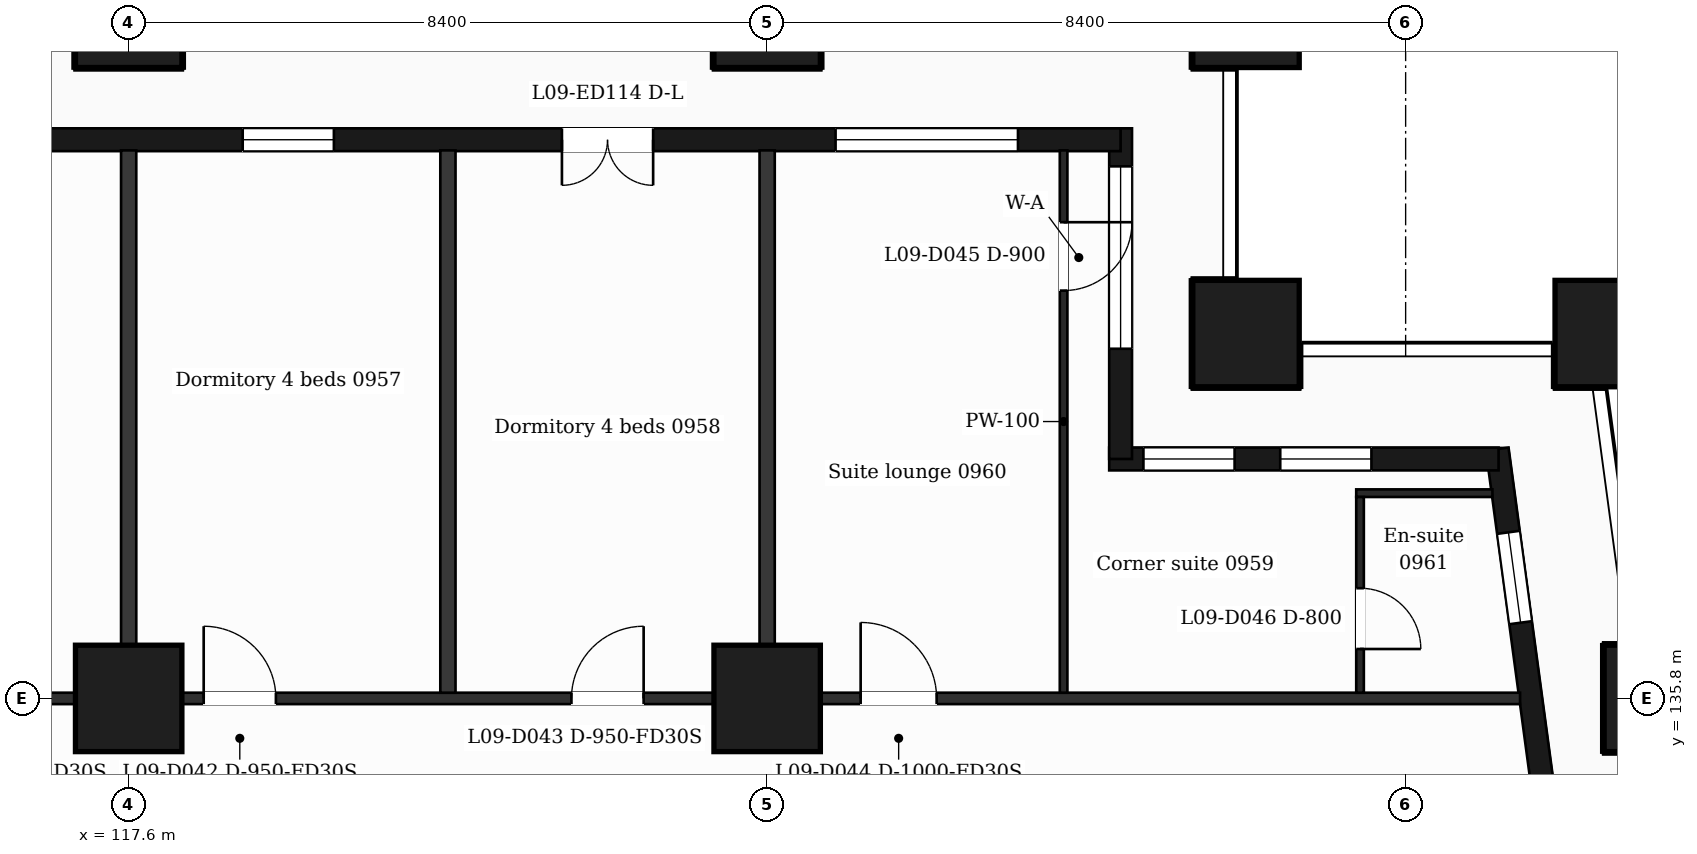
"""IFC4 building model, lengths in metres.
Left out: names, types, materials, properties, quantities, classifications, styles, units other than length and angle.
Written with IfcOpenShell. Run it as: python <this file> out.ifc"""

import sys

from ifc_helpers import new_model, si_unit, direction, frame, frame_2d, origin, origin_2d, place, context, subcontext, project, spatial, rectangle, extrude, element, fill, save


model = new_model("IFC4")
c1 = context("Model", 3, precision=1e-05, world=origin(), true_north=direction((0.0, 1.0)))
c2 = subcontext(c1, "Body", "Model", "MODEL_VIEW")
j1 = project(units=[si_unit("LENGTHUNIT", "METRE"), si_unit("PLANEANGLEUNIT", "RADIAN")], contexts=[c1])
p1 = place(None, origin())
s1 = spatial("IfcSite", under=j1, at=p1, CompositionType="ELEMENT")
p2 = place(p1, origin())
s2 = spatial("IfcBuilding", under=s1, at=p2, CompositionType="ELEMENT")
p3 = place(p2, frame((0.0, 0.0, 49.5)))
s3 = spatial("IfcBuildingStorey", under=s2, at=p3, CompositionType="ELEMENT", Elevation=49.5)
for number, where, z_axis, x_axis in (
    (1, (132.3, 140.6, 0.0), (0.0, 0.0, 1.0), (1.0, 0.0, 0.0)),
    (2, (137.065, 140.6, 0.0), (0.0, 0.0, 1.0), (1.0, 0.0, 0.0)),
    (3, (117.6, 135.8, 0.0), (0.0, 0.0, 1.0), (1.0, 0.0, 0.0)),
    (4, (126.0, 135.8, 0.0), (0.0, 0.0, 1.0), (1.0, 0.0, 0.0)),
    (5, (137.711, 135.8, 0.0), (0.0, 0.0, 1.0), (1.0, 0.0, 0.0)),
    (6, (117.6, 144.8, 0.0), (0.0, 0.0, 1.0), (1.0, 0.0, 0.0)),
    (7, (126.0, 144.8, 0.0), (0.0, 0.0, 1.0), (1.0, 0.0, 0.0)),
    (8, (132.3, 144.8, 0.0), (0.0, 0.0, 1.0), (1.0, 0.0, 0.0)),
):
    element("IfcColumn", number, at=place(p3, frame(where, z_axis=z_axis, x_axis=x_axis)), inside=s3, PredefinedType="COLUMN", context=c2, shape_type="SweptSolid", body=[
        extrude(rectangle(XDim=1.4, YDim=1.4, at=origin_2d()), origin(), (0.0, 0.0, 1.0), 3.5),
    ])
p4 = place(p3, frame((136.504, 132.4, 0.0), z_axis=(0.0, 0.0, 1.0), x_axis=(-0.133399697462, 0.99106231929, 0.0)))
e9 = element("IfcWall", 9, at=p4, inside=s3, PredefinedType="SOLIDWALL", context=c2, shape_type="SweptSolid", body=[
    extrude(rectangle(XDim=6.74, YDim=0.3, at=frame_2d((3.37, 0.0))), origin(), (0.0, 0.0, 1.0), 3.18),
])
p5 = place(p4, frame((1.115, 0.0, 0.0)))
e10 = element("IfcOpeningElement", 10, at=p5, cuts=e9, PredefinedType="OPENING", context=c2, shape_type="SweptSolid", body=[
    extrude(rectangle(XDim=1.2, YDim=2.4, at=frame_2d((0.6, 1.2))), frame((0.0, 0.16, 0.0), z_axis=(0.0, -1.0, 0.0), x_axis=(1.0, 0.0, 0.0)), (0.0, 0.0, 1.0), 0.32),
])
p6 = place(p4, frame((4.436, 0.0, 0.9)))
e11 = element("IfcOpeningElement", 11, at=p6, cuts=e9, PredefinedType="OPENING", context=c2, shape_type="SweptSolid", body=[
    extrude(rectangle(XDim=1.2, YDim=2.1, at=frame_2d((0.6, 1.05))), frame((0.0, 0.16, 0.0), z_axis=(0.0, -1.0, 0.0), x_axis=(1.0, 0.0, 0.0)), (0.0, 0.0, 1.0), 0.32),
])
p7 = place(p3, frame((135.623, 138.95, 0.0), z_axis=(0.0, 0.0, 1.0), x_axis=(-1.0, 0.0, 0.0)))
e12 = element("IfcWall", 12, at=p7, inside=s3, PredefinedType="SOLIDWALL", context=c2, shape_type="SweptSolid", body=[
    extrude(rectangle(XDim=5.123, YDim=0.3, at=frame_2d((2.561, 0.0))), origin(), (0.0, 0.0, 1.0), 3.18),
])
p8 = place(p7, frame((1.673, 0.0, 0.9)))
e13 = element("IfcOpeningElement", 13, at=p8, cuts=e12, PredefinedType="OPENING", context=c2, shape_type="SweptSolid", body=[
    extrude(rectangle(XDim=1.2, YDim=2.1, at=frame_2d((0.6, 1.05))), frame((0.0, 0.16, 0.0), z_axis=(0.0, -1.0, 0.0), x_axis=(1.0, 0.0, 0.0)), (0.0, 0.0, 1.0), 0.32),
])
p9 = place(p7, frame((3.473, 0.0, 0.9)))
e14 = element("IfcOpeningElement", 14, at=p9, cuts=e12, PredefinedType="OPENING", context=c2, shape_type="SweptSolid", body=[
    extrude(rectangle(XDim=1.2, YDim=2.1, at=frame_2d((0.6, 1.05))), frame((0.0, 0.16, 0.0), z_axis=(0.0, -1.0, 0.0), x_axis=(1.0, 0.0, 0.0)), (0.0, 0.0, 1.0), 0.32),
])
p10 = place(p3, frame((130.65, 138.95, 0.0), z_axis=(0.0, 0.0, 1.0), x_axis=(0.0, 1.0, 0.0)))
e15 = element("IfcWall", 15, at=p10, inside=s3, PredefinedType="SOLIDWALL", context=c2, shape_type="SweptSolid", body=[
    extrude(rectangle(XDim=4.35, YDim=0.3, at=frame_2d((2.175, 0.0))), origin(), (0.0, 0.0, 1.0), 3.18),
])
p11 = place(p10, frame((1.45, 0.0, 0.9)))
e16 = element("IfcOpeningElement", 16, at=p11, cuts=e15, PredefinedType="OPENING", context=c2, shape_type="SweptSolid", body=[
    extrude(rectangle(XDim=2.4, YDim=2.1, at=frame_2d((1.2, 1.05))), frame((0.0, 0.16, 0.0), z_axis=(0.0, -1.0, 0.0), x_axis=(1.0, 0.0, 0.0)), (0.0, 0.0, 1.0), 0.32),
])
p12 = place(p3, frame((130.65, 143.15, 0.0), z_axis=(0.0, 0.0, 1.0), x_axis=(-1.0, 0.0, 0.0)))
e17 = element("IfcWall", 17, at=p12, inside=s3, PredefinedType="SOLIDWALL", context=c2, shape_type="SweptSolid", body=[
    extrude(rectangle(XDim=14.25, YDim=0.3, at=frame_2d((7.125, 0.0))), origin(), (0.0, 0.0, 1.0), 3.18),
])
p13 = place(p12, frame((1.35, 0.0, 0.9)))
e18 = element("IfcOpeningElement", 18, at=p13, cuts=e17, PredefinedType="OPENING", context=c2, shape_type="SweptSolid", body=[
    extrude(rectangle(XDim=2.4, YDim=2.1, at=frame_2d((1.2, 1.05))), frame((0.0, 0.16, 0.0), z_axis=(0.0, -1.0, 0.0), x_axis=(1.0, 0.0, 0.0)), (0.0, 0.0, 1.0), 0.32),
])
p14 = place(p12, frame((6.15, 0.0, 0.0)))
e19 = element("IfcOpeningElement", 19, at=p14, cuts=e17, PredefinedType="OPENING", context=c2, shape_type="SweptSolid", body=[
    extrude(rectangle(XDim=1.2, YDim=2.4, at=frame_2d((0.6, 1.2))), frame((0.0, 0.16, 0.0), z_axis=(0.0, -1.0, 0.0), x_axis=(1.0, 0.0, 0.0)), (0.0, 0.0, 1.0), 0.32),
])
p15 = place(p12, frame((10.35, 0.0, 0.9)))
e20 = element("IfcOpeningElement", 20, at=p15, cuts=e17, PredefinedType="OPENING", context=c2, shape_type="SweptSolid", body=[
    extrude(rectangle(XDim=1.2, YDim=2.1, at=frame_2d((0.6, 1.05))), frame((0.0, 0.16, 0.0), z_axis=(0.0, -1.0, 0.0), x_axis=(1.0, 0.0, 0.0)), (0.0, 0.0, 1.0), 0.32),
])
p16 = place(p3, frame((90.895, 135.8, 0.0), z_axis=(0.0, 0.0, 1.0), x_axis=(1.0, 0.0, 0.0)))
e21 = element("IfcWall", 21, at=p16, inside=s3, PredefinedType="PARTITIONING", context=c2, shape_type="SweptSolid", body=[
    extrude(rectangle(XDim=45.011, YDim=0.15, at=frame_2d((22.505, 0.0))), origin(), (0.0, 0.0, 1.0), 3.18),
])
p17 = place(p16, frame((7.675, 0.0, 0.0)))
e22 = element("IfcOpeningElement", 22, at=p17, cuts=e21, PredefinedType="OPENING", context=c2, shape_type="SweptSolid", body=[
    extrude(rectangle(XDim=1.0, YDim=2.1, at=frame_2d((0.5, 1.05))), frame((0.0, 0.085, 0.0), z_axis=(0.0, -1.0, 0.0), x_axis=(1.0, 0.0, 0.0)), (0.0, 0.0, 1.0), 0.17),
])
p18 = place(p16, frame((13.969, 0.0, 0.0)))
e23 = element("IfcOpeningElement", 23, at=p18, cuts=e21, PredefinedType="OPENING", context=c2, shape_type="SweptSolid", body=[
    extrude(rectangle(XDim=0.95, YDim=2.1, at=frame_2d((0.475, 1.05))), frame((0.0, 0.085, 0.0), z_axis=(0.0, -1.0, 0.0), x_axis=(1.0, 0.0, 0.0)), (0.0, 0.0, 1.0), 0.17),
])
p19 = place(p16, frame((24.393, 0.0, 0.0)))
e24 = element("IfcOpeningElement", 24, at=p19, cuts=e21, PredefinedType="OPENING", context=c2, shape_type="SweptSolid", body=[
    extrude(rectangle(XDim=0.95, YDim=2.1, at=frame_2d((0.475, 1.05))), frame((0.0, 0.085, 0.0), z_axis=(0.0, -1.0, 0.0), x_axis=(1.0, 0.0, 0.0)), (0.0, 0.0, 1.0), 0.17),
])
p20 = place(p16, frame((27.692, 0.0, 0.0)))
e25 = element("IfcOpeningElement", 25, at=p20, cuts=e21, PredefinedType="OPENING", context=c2, shape_type="SweptSolid", body=[
    extrude(rectangle(XDim=0.95, YDim=2.1, at=frame_2d((0.475, 1.05))), frame((0.0, 0.085, 0.0), z_axis=(0.0, -1.0, 0.0), x_axis=(1.0, 0.0, 0.0)), (0.0, 0.0, 1.0), 0.17),
])
p21 = place(p16, frame((32.531, 0.0, 0.0)))
e26 = element("IfcOpeningElement", 26, at=p21, cuts=e21, PredefinedType="OPENING", context=c2, shape_type="SweptSolid", body=[
    extrude(rectangle(XDim=0.95, YDim=2.1, at=frame_2d((0.475, 1.05))), frame((0.0, 0.085, 0.0), z_axis=(0.0, -1.0, 0.0), x_axis=(1.0, 0.0, 0.0)), (0.0, 0.0, 1.0), 0.17),
])
p22 = place(p16, frame((36.335, 0.0, 0.0)))
e27 = element("IfcOpeningElement", 27, at=p22, cuts=e21, PredefinedType="OPENING", context=c2, shape_type="SweptSolid", body=[
    extrude(rectangle(XDim=1.0, YDim=2.1, at=frame_2d((0.5, 1.05))), frame((0.0, 0.085, 0.0), z_axis=(0.0, -1.0, 0.0), x_axis=(1.0, 0.0, 0.0)), (0.0, 0.0, 1.0), 0.17),
])
p23 = place(p3, frame((133.75, 138.5, 0.0), z_axis=(0.0, 0.0, 1.0), x_axis=(1.0, 0.0, 0.0)))
e28 = element("IfcWall", 28, at=p23, inside=s3, PredefinedType="PARTITIONING", context=c2, shape_type="SweptSolid", body=[
    extrude(rectangle(XDim=1.792, YDim=0.1, at=frame_2d((0.896, 0.0))), origin(), (0.0, 0.0, 1.0), 3.18),
])
for number, where, z_axis, x_axis in (
    (29, (117.6, 135.875, 0.0), (0.0, 0.0, 1.0), (0.0, 1.0, 0.0)),
    (30, (121.8, 135.875, 0.0), (0.0, 0.0, 1.0), (0.0, 1.0, 0.0)),
    (31, (126.0, 135.875, 0.0), (0.0, 0.0, 1.0), (0.0, 1.0, 0.0)),
):
    element("IfcWall", number, at=place(p3, frame(where, z_axis=z_axis, x_axis=x_axis)), inside=s3, PredefinedType="PARTITIONING", context=c2, shape_type="SweptSolid", body=[
        extrude(rectangle(XDim=7.135, YDim=0.2, at=frame_2d((3.567, 0.0))), origin(), (0.0, 0.0, 1.0), 3.18),
    ])
p24 = place(p3, frame((129.9, 135.875, 0.0), z_axis=(0.0, 0.0, 1.0), x_axis=(0.0, 1.0, 0.0)))
e32 = element("IfcWall", 32, at=p24, inside=s3, PredefinedType="PARTITIONING", context=c2, shape_type="SweptSolid", body=[
    extrude(rectangle(XDim=7.135, YDim=0.1, at=frame_2d((3.567, 0.0))), origin(), (0.0, 0.0, 1.0), 3.18),
])
p25 = place(p24, frame((5.29, 0.0, 0.0)))
e33 = element("IfcOpeningElement", 33, at=p25, cuts=e32, PredefinedType="OPENING", context=c2, shape_type="SweptSolid", body=[
    extrude(rectangle(XDim=0.9, YDim=2.1, at=frame_2d((0.45, 1.05))), frame((0.0, 0.06, 0.0), z_axis=(0.0, -1.0, 0.0), x_axis=(1.0, 0.0, 0.0)), (0.0, 0.0, 1.0), 0.12),
])
p26 = place(p3, frame((133.8, 135.875, 0.0), z_axis=(0.0, 0.0, 1.0), x_axis=(0.0, 1.0, 0.0)))
e34 = element("IfcWall", 34, at=p26, inside=s3, PredefinedType="PARTITIONING", context=c2, shape_type="SweptSolid", body=[
    extrude(rectangle(XDim=2.575, YDim=0.1, at=frame_2d((1.288, 0.0))), origin(), (0.0, 0.0, 1.0), 3.18),
])
p27 = place(p26, frame((0.575, 0.0, 0.0)))
e35 = element("IfcOpeningElement", 35, at=p27, cuts=e34, PredefinedType="OPENING", context=c2, shape_type="SweptSolid", body=[
    extrude(rectangle(XDim=0.8, YDim=2.1, at=frame_2d((0.4, 1.05))), frame((0.0, 0.06, 0.0), z_axis=(0.0, -1.0, 0.0), x_axis=(1.0, 0.0, 0.0)), (0.0, 0.0, 1.0), 0.12),
])
p28 = place(p6, origin())
e36 = element("IfcWindow", 36, at=p28, inside=s3, PartitioningType="SINGLE_PANEL", PredefinedType="WINDOW", context=c2, shape_type="SweptSolid", body=[
    extrude(rectangle(XDim=1.2, YDim=2.1, at=frame_2d((0.6, 1.05))), frame((0.0, 0.03, 0.0), z_axis=(0.0, -1.0, 0.0), x_axis=(1.0, 0.0, 0.0)), (0.0, 0.0, 1.0), 0.06),
])
fill(e11, e36)
p29 = place(p8, origin())
e37 = element("IfcWindow", 37, at=p29, inside=s3, PartitioningType="SINGLE_PANEL", PredefinedType="WINDOW", context=c2, shape_type="SweptSolid", body=[
    extrude(rectangle(XDim=1.2, YDim=2.1, at=frame_2d((0.6, 1.05))), frame((0.0, 0.03, 0.0), z_axis=(0.0, -1.0, 0.0), x_axis=(1.0, 0.0, 0.0)), (0.0, 0.0, 1.0), 0.06),
])
fill(e13, e37)
p30 = place(p9, origin())
e38 = element("IfcWindow", 38, at=p30, inside=s3, PartitioningType="SINGLE_PANEL", PredefinedType="WINDOW", context=c2, shape_type="SweptSolid", body=[
    extrude(rectangle(XDim=1.2, YDim=2.1, at=frame_2d((0.6, 1.05))), frame((0.0, 0.03, 0.0), z_axis=(0.0, -1.0, 0.0), x_axis=(1.0, 0.0, 0.0)), (0.0, 0.0, 1.0), 0.06),
])
fill(e14, e38)
p31 = place(p11, origin())
e39 = element("IfcWindow", 39, at=p31, inside=s3, PartitioningType="SINGLE_PANEL", PredefinedType="WINDOW", context=c2, shape_type="SweptSolid", body=[
    extrude(rectangle(XDim=2.4, YDim=2.1, at=frame_2d((1.2, 1.05))), frame((0.0, 0.03, 0.0), z_axis=(0.0, -1.0, 0.0), x_axis=(1.0, 0.0, 0.0)), (0.0, 0.0, 1.0), 0.06),
])
fill(e16, e39)
p32 = place(p13, origin())
e40 = element("IfcWindow", 40, at=p32, inside=s3, PartitioningType="SINGLE_PANEL", PredefinedType="WINDOW", context=c2, shape_type="SweptSolid", body=[
    extrude(rectangle(XDim=2.4, YDim=2.1, at=frame_2d((1.2, 1.05))), frame((0.0, 0.03, 0.0), z_axis=(0.0, -1.0, 0.0), x_axis=(1.0, 0.0, 0.0)), (0.0, 0.0, 1.0), 0.06),
])
fill(e18, e40)
p33 = place(p14, origin())
e41 = element("IfcDoor", 41, at=p33, inside=s3, OperationType="DOUBLE_DOOR_SINGLE_SWING", PredefinedType="DOOR", context=c2, shape_type="SweptSolid", body=[
    extrude(rectangle(XDim=1.2, YDim=2.4, at=frame_2d((0.6, 1.2))), frame((0.0, 0.025, 0.0), z_axis=(0.0, -1.0, 0.0), x_axis=(1.0, 0.0, 0.0)), (0.0, 0.0, 1.0), 0.05),
])
fill(e19, e41)
p34 = place(p15, origin())
e42 = element("IfcWindow", 42, at=p34, inside=s3, PartitioningType="SINGLE_PANEL", PredefinedType="WINDOW", context=c2, shape_type="SweptSolid", body=[
    extrude(rectangle(XDim=1.2, YDim=2.1, at=frame_2d((0.6, 1.05))), frame((0.0, 0.03, 0.0), z_axis=(0.0, -1.0, 0.0), x_axis=(1.0, 0.0, 0.0)), (0.0, 0.0, 1.0), 0.06),
])
fill(e20, e42)
p35 = place(p20, origin())
e43 = element("IfcDoor", 43, at=p35, inside=s3, OperationType="SINGLE_SWING_LEFT", PredefinedType="DOOR", context=c2, shape_type="SweptSolid", body=[
    extrude(rectangle(XDim=0.95, YDim=2.1, at=frame_2d((0.475, 1.05))), frame((0.0, 0.025, 0.0), z_axis=(0.0, -1.0, 0.0), x_axis=(1.0, 0.0, 0.0)), (0.0, 0.0, 1.0), 0.05),
])
fill(e25, e43)
p36 = place(p21, origin())
e44 = element("IfcDoor", 44, at=p36, inside=s3, OperationType="SINGLE_SWING_RIGHT", PredefinedType="DOOR", context=c2, shape_type="SweptSolid", body=[
    extrude(rectangle(XDim=0.95, YDim=2.1, at=frame_2d((0.475, 1.05))), frame((0.0, 0.025, 0.0), z_axis=(0.0, -1.0, 0.0), x_axis=(1.0, 0.0, 0.0)), (0.0, 0.0, 1.0), 0.05),
])
fill(e26, e44)
p37 = place(p22, origin())
e45 = element("IfcDoor", 45, at=p37, inside=s3, OperationType="SINGLE_SWING_LEFT", PredefinedType="DOOR", context=c2, shape_type="SweptSolid", body=[
    extrude(rectangle(XDim=1.0, YDim=2.1, at=frame_2d((0.5, 1.05))), frame((0.0, 0.025, 0.0), z_axis=(0.0, -1.0, 0.0), x_axis=(1.0, 0.0, 0.0)), (0.0, 0.0, 1.0), 0.05),
])
fill(e27, e45)
p38 = place(p25, origin())
e46 = element("IfcDoor", 46, at=p38, inside=s3, OperationType="SINGLE_SWING_RIGHT", PredefinedType="DOOR", context=c2, shape_type="SweptSolid", body=[
    extrude(rectangle(XDim=0.9, YDim=2.1, at=frame_2d((0.45, 1.05))), frame((0.0, 0.025, 0.0), z_axis=(0.0, -1.0, 0.0), x_axis=(1.0, 0.0, 0.0)), (0.0, 0.0, 1.0), 0.05),
])
fill(e33, e46)
p39 = place(p27, origin())
e47 = element("IfcDoor", 47, at=p39, inside=s3, OperationType="SINGLE_SWING_LEFT", PredefinedType="DOOR", context=c2, shape_type="SweptSolid", body=[
    extrude(rectangle(XDim=0.8, YDim=2.1, at=frame_2d((0.4, 1.05))), frame((0.0, 0.025, 0.0), z_axis=(0.0, -1.0, 0.0), x_axis=(1.0, 0.0, 0.0)), (0.0, 0.0, 1.0), 0.05),
])
fill(e35, e47)
save(model, sys.argv[1])
